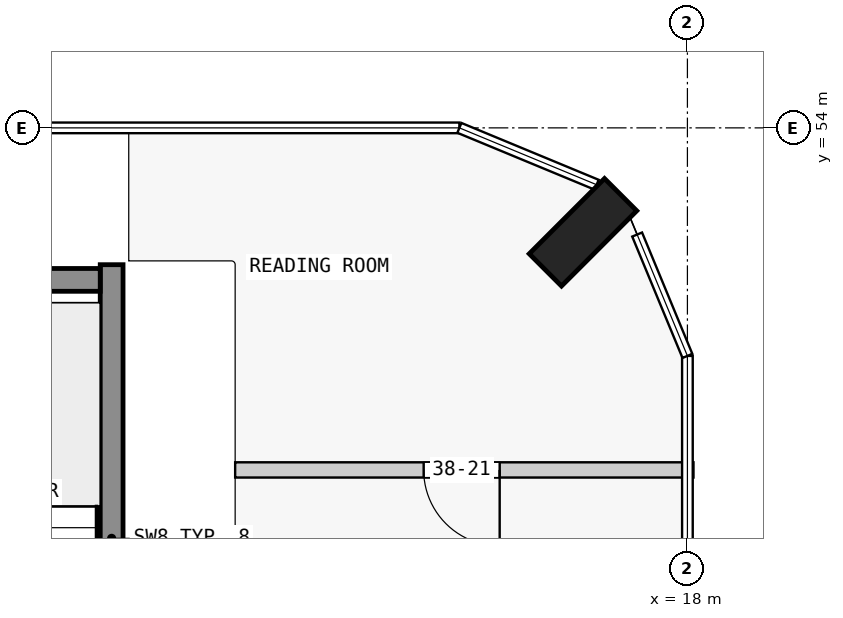
"""IFC4 building model, lengths in metres.
Left out: names, types, materials, properties, quantities, classifications, styles, units other than length and angle.
Written with IfcOpenShell. Run it as: python <this file> out.ifc"""

import sys

from ifc_helpers import new_model, si_unit, direction, frame, frame_2d, origin, origin_2d, place, context, subcontext, project, spatial, rectangle, extrude, element, fill, save


model = new_model("IFC4")
c1 = context("Model", 3, precision=1e-05, world=origin(), true_north=direction((0.0, 1.0)))
c2 = subcontext(c1, "Body", "Model", "MODEL_VIEW")
j1 = project(units=[si_unit("LENGTHUNIT", "METRE"), si_unit("PLANEANGLEUNIT", "RADIAN")], contexts=[c1])
p1 = place(None, origin())
s1 = spatial("IfcSite", under=j1, at=p1, CompositionType="ELEMENT")
p2 = place(p1, origin())
s2 = spatial("IfcBuilding", under=s1, at=p2, CompositionType="ELEMENT")
p3 = place(p2, frame((0.0, 0.0, 149.9)))
s3 = spatial("IfcBuildingStorey", under=s2, at=p3, CompositionType="ELEMENT", Elevation=149.9)
p4 = place(p3, frame((16.626, 52.626, 0.0), z_axis=(0.0, 0.0, 1.0), x_axis=(-0.707106781187, 0.707106781187, 0.0)))
e1 = element("IfcColumn", 1, at=p4, inside=s3, PredefinedType="COLUMN", context=c2, shape_type="SweptSolid", body=[
    extrude(rectangle(XDim=0.6, YDim=1.4, at=origin_2d()), origin(), (0.0, 0.0, 1.0), 3.5),
])
p5 = place(p3, frame((7.725, 52.0, 0.0), z_axis=(0.0, 0.0, 1.0), x_axis=(1.0, 0.0, 0.0)))
e2 = element("IfcWall", 2, at=p5, inside=s3, PredefinedType="SHEAR", context=c2, shape_type="SweptSolid", body=[
    extrude(rectangle(XDim=2.55, YDim=0.3, at=frame_2d((1.275, 0.0))), origin(), (0.0, 0.0, 1.0), 3.5),
])
p6 = place(p3, frame((10.425, 45.0, 0.0), z_axis=(0.0, 0.0, 1.0), x_axis=(0.0, 1.0, 0.0)))
e3 = element("IfcWall", 3, at=p6, inside=s3, PredefinedType="SHEAR", context=c2, shape_type="SweptSolid", body=[
    extrude(rectangle(XDim=7.2, YDim=0.3, at=frame_2d((3.6, 0.0))), origin(), (0.0, 0.0, 1.0), 3.5),
])
p7 = place(p3, frame((18.08, 49.5, 0.0), z_axis=(0.0, 0.0, 1.0), x_axis=(-1.0, 0.0, 0.0)))
e4 = element("IfcWall", 4, at=p7, inside=s3, PredefinedType="PARTITIONING", context=c2, shape_type="SweptSolid", body=[
    extrude(rectangle(XDim=6.03, YDim=0.2, at=frame_2d((3.015, 0.0))), origin(), (0.0, 0.0, 1.0), 3.25),
])
p8 = place(p7, frame((2.55, 0.0, 0.0)))
e5 = element("IfcOpeningElement", 5, at=p8, cuts=e4, PredefinedType="OPENING", context=c2, shape_type="SweptSolid", body=[
    extrude(rectangle(XDim=1.0, YDim=2.1, at=frame_2d((0.5, 1.05))), frame((0.0, 0.11, 0.0), z_axis=(0.0, -1.0, 0.0), x_axis=(1.0, 0.0, 0.0)), (0.0, 0.0, 1.0), 0.22),
])
p9 = place(p8, origin())
e6 = element("IfcDoor", 6, at=p9, inside=s3, OperationType="SINGLE_SWING_RIGHT", PredefinedType="DOOR", context=c2, shape_type="SweptSolid", body=[
    extrude(rectangle(XDim=1.0, YDim=2.1, at=frame_2d((0.5, 1.05))), frame((0.0, 0.025, 0.0), z_axis=(0.0, -1.0, 0.0), x_axis=(1.0, 0.0, 0.0)), (0.0, 0.0, 1.0), 0.05),
])
fill(e5, e6)
save(model, sys.argv[1])
